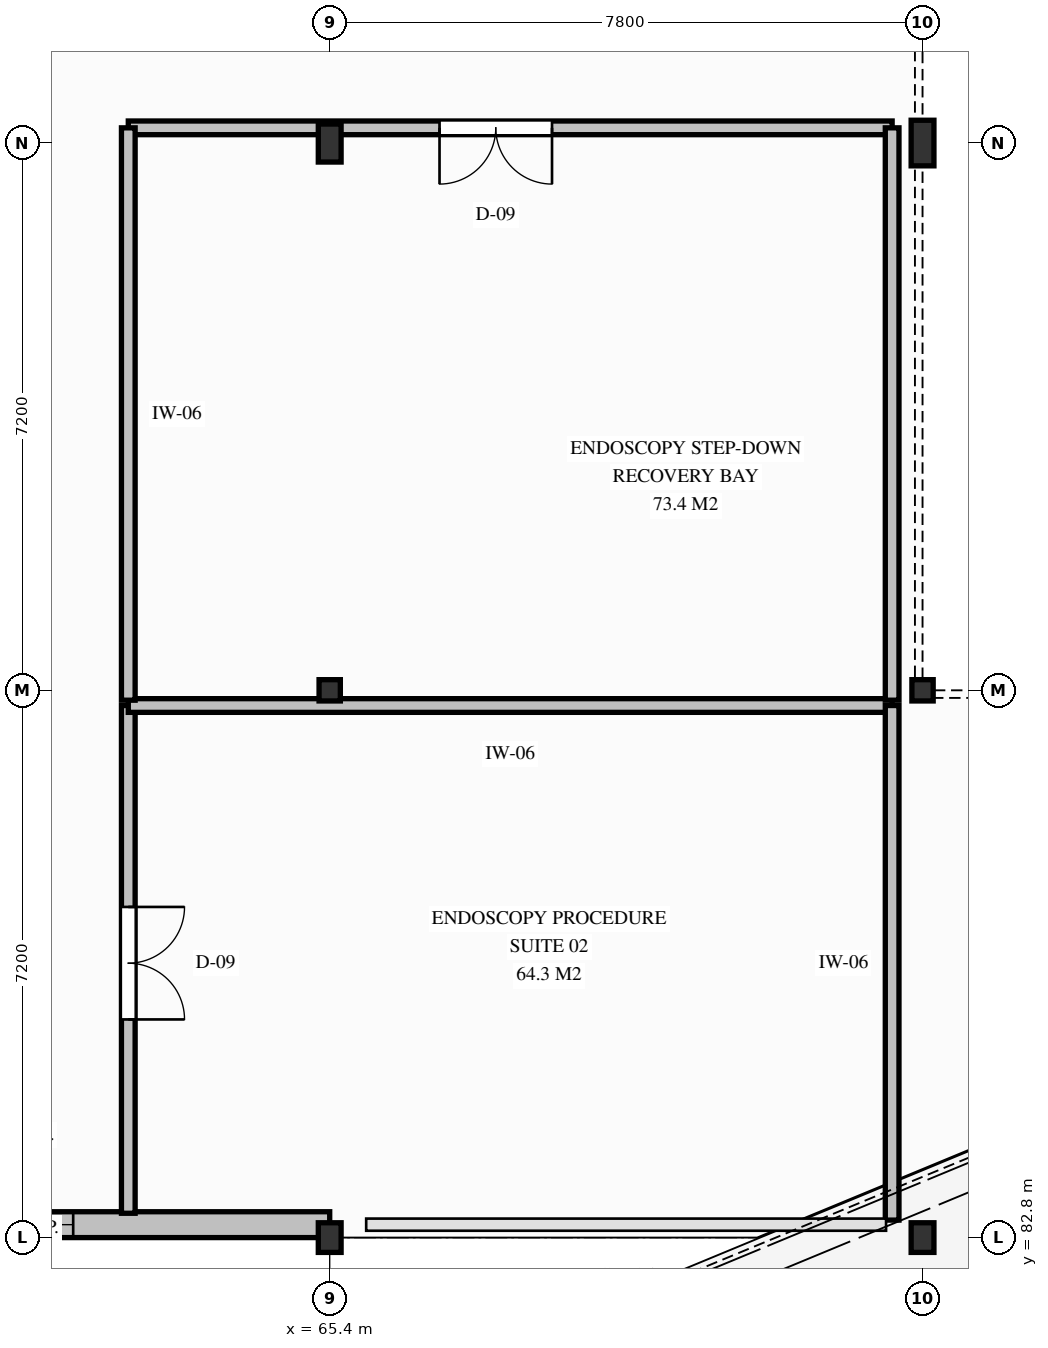
"""IFC4 building model, lengths in metres.
Left out: names, types, materials, properties, quantities, classifications, styles, units other than length and angle.
Written with IfcOpenShell. Run it as: python <this file> out.ifc"""

import sys

from ifc_helpers import new_model, si_unit, direction, frame, frame_2d, origin, origin_2d, place, context, subcontext, project, spatial, rectangle, i_section, extrude, element, fill, save


model = new_model("IFC4")
c1 = context("Model", 3, precision=1e-05, world=origin(), true_north=direction((0.0, 1.0)))
c2 = subcontext(c1, "Body", "Model", "MODEL_VIEW")
j1 = project(units=[si_unit("LENGTHUNIT", "METRE"), si_unit("PLANEANGLEUNIT", "RADIAN")], contexts=[c1])
p1 = place(None, origin())
s1 = spatial("IfcSite", under=j1, at=p1, CompositionType="ELEMENT")
p2 = place(p1, origin())
s2 = spatial("IfcBuilding", under=s1, at=p2, CompositionType="ELEMENT")
p3 = place(p2, frame((0.0, 0.0, 4.5)))
s3 = spatial("IfcBuildingStorey", under=s2, at=p3, CompositionType="ELEMENT", Elevation=4.5)
p4 = place(p3, frame((65.4, 82.8, 0.0), z_axis=(0.0, 0.0, 1.0), x_axis=(1.0, 0.0, 0.0)))
e1 = element("IfcColumn", 1, at=p4, inside=s3, PredefinedType="COLUMN", context=c2, shape_type="SweptSolid", body=[
    extrude(i_section(OverallWidth=0.3, OverallDepth=0.39, WebThickness=0.011, FlangeThickness=0.019, FilletRadius=0.027, at=origin_2d()), origin(), (0.0, 0.0, 1.0), 4.5),
])
p5 = place(p3, frame((65.4, 90.0, 0.0), z_axis=(0.0, 0.0, 1.0), x_axis=(1.0, 0.0, 0.0)))
e2 = element("IfcColumn", 2, at=p5, inside=s3, PredefinedType="COLUMN", context=c2, shape_type="SweptSolid", body=[
    extrude(i_section(OverallWidth=0.28, OverallDepth=0.28, WebThickness=0.01, FlangeThickness=0.018, FilletRadius=0.024, at=origin_2d()), origin(), (0.0, 0.0, 1.0), 4.5),
])
p6 = place(p3, frame((65.4, 97.2, 0.0), z_axis=(0.0, 0.0, 1.0), x_axis=(1.0, 0.0, 0.0)))
e3 = element("IfcColumn", 3, at=p6, inside=s3, PredefinedType="COLUMN", context=c2, shape_type="SweptSolid", body=[
    extrude(i_section(OverallWidth=0.3, OverallDepth=0.5, WebThickness=0.014, FlangeThickness=0.028, FilletRadius=0.027, at=origin_2d()), origin(), (0.0, 0.0, 1.0), 4.5),
])
p7 = place(p3, frame((73.2, 82.8, 0.0), z_axis=(0.0, 0.0, 1.0), x_axis=(1.0, 0.0, 0.0)))
e4 = element("IfcColumn", 4, at=p7, inside=s3, PredefinedType="COLUMN", context=c2, shape_type="SweptSolid", body=[
    extrude(i_section(OverallWidth=0.3, OverallDepth=0.39, WebThickness=0.011, FlangeThickness=0.019, FilletRadius=0.027, at=origin_2d()), origin(), (0.0, 0.0, 1.0), 4.5),
])
p8 = place(p3, frame((73.2, 90.0, 0.0), z_axis=(0.0, 0.0, 1.0), x_axis=(1.0, 0.0, 0.0)))
e5 = element("IfcColumn", 5, at=p8, inside=s3, PredefinedType="COLUMN", context=c2, shape_type="SweptSolid", body=[
    extrude(i_section(OverallWidth=0.28, OverallDepth=0.28, WebThickness=0.01, FlangeThickness=0.018, FilletRadius=0.024, at=origin_2d()), origin(), (0.0, 0.0, 1.0), 4.5),
])
p9 = place(p3, frame((73.2, 97.2, 0.0), z_axis=(0.0, 0.0, 1.0), x_axis=(1.0, 0.0, 0.0)))
e6 = element("IfcColumn", 6, at=p9, inside=s3, PredefinedType="COLUMN", context=c2, shape_type="SweptSolid", body=[
    extrude(i_section(OverallWidth=0.3, OverallDepth=0.6, WebThickness=0.015, FlangeThickness=0.03, FilletRadius=0.027, at=origin_2d()), origin(), (0.0, 0.0, 1.0), 4.5),
])
p10 = place(p3, frame((65.4, 82.97, 0.0), z_axis=(0.0, 0.0, 1.0), x_axis=(-1.0, 0.0, 0.0)))
e7 = element("IfcWall", 7, at=p10, inside=s3, PredefinedType="SOLIDWALL", context=c2, shape_type="SweptSolid", body=[
    extrude(rectangle(XDim=8.4, YDim=0.34, at=frame_2d((4.2, 0.0))), origin(), (0.0, 0.0, 1.0), 3.678),
])
p11 = place(p10, frame((3.375, 0.0, 0.85)))
e8 = element("IfcOpeningElement", 8, at=p11, cuts=e7, PredefinedType="OPENING", context=c2, shape_type="SweptSolid", body=[
    extrude(rectangle(XDim=1.65, YDim=1.45, at=frame_2d((0.825, 0.725))), frame((0.0, 0.18, 0.0), z_axis=(0.0, -1.0, 0.0), x_axis=(1.0, 0.0, 0.0)), (0.0, 0.0, 1.0), 0.36),
])
p12 = place(p3, frame((62.75, 89.8, 0.0), z_axis=(0.0, 0.0, 1.0), x_axis=(0.0, -1.0, 0.0)))
e9 = element("IfcWall", 9, at=p12, inside=s3, PredefinedType="PARTITIONING", context=c2, shape_type="SweptSolid", body=[
    extrude(rectangle(XDim=6.68, YDim=0.18, at=frame_2d((3.34, 0.0))), origin(), (0.0, 0.0, 1.0), 3.928),
])
p13 = place(p12, frame((2.65, 0.0, 0.0)))
e10 = element("IfcOpeningElement", 10, at=p13, cuts=e9, PredefinedType="OPENING", context=c2, shape_type="SweptSolid", body=[
    extrude(rectangle(XDim=1.48, YDim=2.24, at=frame_2d((0.74, 1.12))), frame((0.0, 0.1, 0.0), z_axis=(0.0, -1.0, 0.0), x_axis=(1.0, 0.0, 0.0)), (0.0, 0.0, 1.0), 0.2),
])
p14 = place(p3, frame((72.8, 89.8, 0.0), z_axis=(0.0, 0.0, 1.0), x_axis=(-1.0, 0.0, 0.0)))
e11 = element("IfcWall", 11, at=p14, inside=s3, PredefinedType="PARTITIONING", context=c2, shape_type="SweptSolid", body=[
    extrude(rectangle(XDim=10.05, YDim=0.18, at=frame_2d((5.025, 0.0))), origin(), (0.0, 0.0, 1.0), 3.888),
])
p15 = place(p3, frame((72.8, 83.03, 0.0), z_axis=(0.0, 0.0, 1.0), x_axis=(0.0, 1.0, 0.0)))
e12 = element("IfcWall", 12, at=p15, inside=s3, PredefinedType="PARTITIONING", context=c2, shape_type="SweptSolid", body=[
    extrude(rectangle(XDim=6.77, YDim=0.18, at=frame_2d((3.385, 0.0))), origin(), (0.0, 0.0, 1.0), 3.928),
])
p16 = place(p3, frame((72.8, 97.4, 0.0), z_axis=(0.0, 0.0, 1.0), x_axis=(-1.0, 0.0, 0.0)))
e13 = element("IfcWall", 13, at=p16, inside=s3, PredefinedType="PARTITIONING", context=c2, shape_type="SweptSolid", body=[
    extrude(rectangle(XDim=10.05, YDim=0.18, at=frame_2d((5.025, 0.0))), origin(), (0.0, 0.0, 1.0), 3.788),
])
p17 = place(p16, frame((4.475, 0.0, 0.0)))
e14 = element("IfcOpeningElement", 14, at=p17, cuts=e13, PredefinedType="OPENING", context=c2, shape_type="SweptSolid", body=[
    extrude(rectangle(XDim=1.48, YDim=2.24, at=frame_2d((0.74, 1.12))), frame((0.0, 0.1, 0.0), z_axis=(0.0, -1.0, 0.0), x_axis=(1.0, 0.0, 0.0)), (0.0, 0.0, 1.0), 0.2),
])
p18 = place(p3, frame((62.75, 97.4, 0.0), z_axis=(0.0, 0.0, 1.0), x_axis=(0.0, -1.0, 0.0)))
e15 = element("IfcWall", 15, at=p18, inside=s3, PredefinedType="PARTITIONING", context=c2, shape_type="SweptSolid", body=[
    extrude(rectangle(XDim=7.53, YDim=0.18, at=frame_2d((3.765, 0.0))), origin(), (0.0, 0.0, 1.0), 3.788),
])
p19 = place(p3, frame((72.8, 89.87, 0.0), z_axis=(0.0, 0.0, 1.0), x_axis=(0.0, 1.0, 0.0)))
e16 = element("IfcWall", 16, at=p19, inside=s3, PredefinedType="PARTITIONING", context=c2, shape_type="SweptSolid", body=[
    extrude(rectangle(XDim=7.53, YDim=0.18, at=frame_2d((3.765, 0.0))), origin(), (0.0, 0.0, 1.0), 3.838),
])
p20 = place(p11, origin())
e17 = element("IfcWindow", 17, at=p20, inside=s3, PartitioningType="SINGLE_PANEL", PredefinedType="WINDOW", context=c2, shape_type="SweptSolid", body=[
    extrude(rectangle(XDim=1.65, YDim=1.45, at=frame_2d((0.825, 0.725))), frame((0.0, 0.03, 0.0), z_axis=(0.0, -1.0, 0.0), x_axis=(1.0, 0.0, 0.0)), (0.0, 0.0, 1.0), 0.06),
])
fill(e8, e17)
p21 = place(p13, origin())
e18 = element("IfcDoor", 18, at=p21, inside=s3, OperationType="DOUBLE_DOOR_SINGLE_SWING", PredefinedType="DOOR", context=c2, shape_type="SweptSolid", body=[
    extrude(rectangle(XDim=1.48, YDim=2.24, at=frame_2d((0.74, 1.12))), frame((0.0, 0.025, 0.0), z_axis=(0.0, -1.0, 0.0), x_axis=(1.0, 0.0, 0.0)), (0.0, 0.0, 1.0), 0.05),
])
fill(e10, e18)
p22 = place(p17, origin())
e19 = element("IfcDoor", 19, at=p22, inside=s3, OperationType="DOUBLE_DOOR_SINGLE_SWING", PredefinedType="DOOR", context=c2, shape_type="SweptSolid", body=[
    extrude(rectangle(XDim=1.48, YDim=2.24, at=frame_2d((0.74, 1.12))), frame((0.0, 0.025, 0.0), z_axis=(0.0, -1.0, 0.0), x_axis=(1.0, 0.0, 0.0)), (0.0, 0.0, 1.0), 0.05),
])
fill(e14, e19)
save(model, sys.argv[1])
